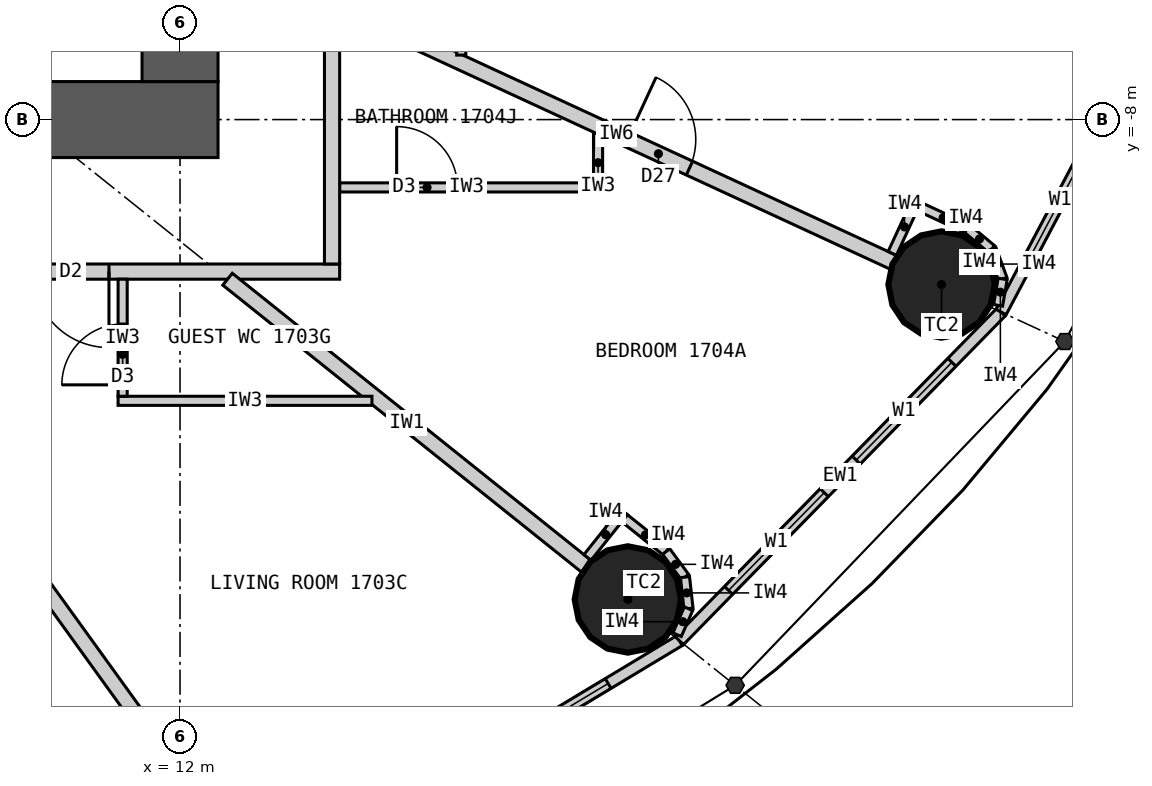
"""IFC4 building model, lengths in metres.
Left out: names, types, materials, properties, quantities, classifications, styles, units other than length and angle.
Written with IfcOpenShell. Run it as: python <this file> out.ifc"""

import sys

from ifc_helpers import new_model, si_unit, direction, frame, frame_2d, origin, origin_2d, place, context, subcontext, project, spatial, rectangle, circle, extrude, element, fill, save


model = new_model("IFC4")
c1 = context("Model", 3, precision=1e-05, world=origin(), true_north=direction((0.0, 1.0)))
c2 = subcontext(c1, "Body", "Model", "MODEL_VIEW")
j1 = project(units=[si_unit("LENGTHUNIT", "METRE"), si_unit("PLANEANGLEUNIT", "RADIAN")], contexts=[c1])
p1 = place(None, origin())
s1 = spatial("IfcSite", under=j1, at=p1, CompositionType="ELEMENT")
p2 = place(p1, origin())
s2 = spatial("IfcBuilding", under=s1, at=p2, CompositionType="ELEMENT")
p3 = place(p2, frame((0.0, 0.0, 70.5)))
s3 = spatial("IfcBuildingStorey", under=s2, at=p3, CompositionType="ELEMENT", Elevation=70.5)
for number, where, z_axis, x_axis in (
    (1, (17.892, -14.313, 0.0), (0.0, 0.0, 1.0), (1.0, 0.0, 0.0)),
    (2, (22.019, -10.17, 0.0), (0.0, 0.0, 1.0), (1.0, 0.0, 0.0)),
):
    element("IfcColumn", number, at=place(p3, frame(where, z_axis=z_axis, x_axis=x_axis)), inside=s3, PredefinedType="COLUMN", context=c2, shape_type="SweptSolid", body=[
        extrude(circle(Radius=0.7, at=origin_2d()), origin(), (0.0, 0.0, 1.0), 3.3),
    ])
p4 = place(p3, frame((12.5, -8.0, 0.0), z_axis=(0.0, 0.0, 1.0), x_axis=(-1.0, 0.0, 0.0)))
e3 = element("IfcWall", 3, at=p4, inside=s3, PredefinedType="SHEAR", context=c2, shape_type="SweptSolid", body=[
    extrude(rectangle(XDim=25.0, YDim=1.0, at=frame_2d((12.5, 0.0))), origin(), (0.0, 0.0, 1.0), 3.3),
])
p5 = place(p4, frame((11.2, 0.0, 0.0)))
e4 = element("IfcOpeningElement", 4, at=p5, cuts=e3, PredefinedType="OPENING", context=c2, shape_type="SweptSolid", body=[
    extrude(rectangle(XDim=1.2, YDim=2.2, at=frame_2d((0.6, 1.1))), frame((0.0, 0.51, 0.0), z_axis=(0.0, -1.0, 0.0), x_axis=(1.0, 0.0, 0.0)), (0.0, 0.0, 1.0), 1.02),
])
p6 = place(p4, frame((18.8, 0.0, 0.0)))
e5 = element("IfcOpeningElement", 5, at=p6, cuts=e3, PredefinedType="OPENING", context=c2, shape_type="SweptSolid", body=[
    extrude(rectangle(XDim=0.9, YDim=2.2, at=frame_2d((0.45, 1.1))), frame((0.0, 0.51, 0.0), z_axis=(0.0, -1.0, 0.0), x_axis=(1.0, 0.0, 0.0)), (0.0, 0.0, 1.0), 1.02),
])
p7 = place(p3, frame((12.0, -7.5, 0.0), z_axis=(0.0, 0.0, 1.0), x_axis=(0.0, 1.0, 0.0)))
e6 = element("IfcWall", 6, at=p7, inside=s3, PredefinedType="SHEAR", context=c2, shape_type="SweptSolid", body=[
    extrude(rectangle(XDim=15.0, YDim=1.0, at=frame_2d((7.5, 0.0))), origin(), (0.0, 0.0, 1.0), 3.3),
])
p8 = place(p7, frame((6.6, 0.0, 0.0)))
e7 = element("IfcOpeningElement", 7, at=p8, cuts=e6, PredefinedType="OPENING", context=c2, shape_type="SweptSolid", body=[
    extrude(rectangle(XDim=1.8, YDim=2.2, at=frame_2d((0.9, 1.1))), frame((0.0, 0.51, 0.0), z_axis=(0.0, -1.0, 0.0), x_axis=(1.0, 0.0, 0.0)), (0.0, 0.0, 1.0), 1.02),
])
p9 = place(p3, frame((13.096, -18.147, 0.0), z_axis=(0.0, 0.0, 1.0), x_axis=(0.856983180864, 0.515344377787, 0.0)))
e8 = element("IfcWall", 8, at=p9, inside=s3, PredefinedType="ELEMENTEDWALL", context=c2, shape_type="SweptSolid", body=[
    extrude(rectangle(XDim=6.386, YDim=0.15, at=frame_2d((3.193, 0.0))), origin(), (0.0, 0.0, 1.0), 3.12),
])
p10 = place(p9, frame((1.093, 0.0, 0.9)))
e9 = element("IfcOpeningElement", 9, at=p10, cuts=e8, PredefinedType="OPENING", context=c2, shape_type="SweptSolid", body=[
    extrude(rectangle(XDim=1.8, YDim=1.9, at=frame_2d((0.9, 0.95))), frame((0.0, 0.085, 0.0), z_axis=(0.0, -1.0, 0.0), x_axis=(1.0, 0.0, 0.0)), (0.0, 0.0, 1.0), 0.17),
])
p11 = place(p9, frame((3.493, 0.0, 0.9)))
e10 = element("IfcOpeningElement", 10, at=p11, cuts=e8, PredefinedType="OPENING", context=c2, shape_type="SweptSolid", body=[
    extrude(rectangle(XDim=1.8, YDim=1.9, at=frame_2d((0.9, 0.95))), frame((0.0, 0.085, 0.0), z_axis=(0.0, -1.0, 0.0), x_axis=(1.0, 0.0, 0.0)), (0.0, 0.0, 1.0), 0.17),
])
p12 = place(p3, frame((18.57, -14.856, 0.0), z_axis=(0.0, 0.0, 1.0), x_axis=(0.699602905915, 0.714531856557, 0.0)))
e11 = element("IfcWall", 11, at=p12, inside=s3, PredefinedType="ELEMENTEDWALL", context=c2, shape_type="SweptSolid", body=[
    extrude(rectangle(XDim=6.051, YDim=0.15, at=frame_2d((3.025, 0.0))), origin(), (0.0, 0.0, 1.0), 3.12),
])
p13 = place(p12, frame((0.926, 0.0, 0.9)))
e12 = element("IfcOpeningElement", 12, at=p13, cuts=e11, PredefinedType="OPENING", context=c2, shape_type="SweptSolid", body=[
    extrude(rectangle(XDim=1.8, YDim=1.9, at=frame_2d((0.9, 0.95))), frame((0.0, 0.085, 0.0), z_axis=(0.0, -1.0, 0.0), x_axis=(1.0, 0.0, 0.0)), (0.0, 0.0, 1.0), 0.17),
])
p14 = place(p12, frame((3.325, 0.0, 0.9)))
e13 = element("IfcOpeningElement", 13, at=p14, cuts=e11, PredefinedType="OPENING", context=c2, shape_type="SweptSolid", body=[
    extrude(rectangle(XDim=1.8, YDim=1.9, at=frame_2d((0.9, 0.95))), frame((0.0, 0.085, 0.0), z_axis=(0.0, -1.0, 0.0), x_axis=(1.0, 0.0, 0.0)), (0.0, 0.0, 1.0), 0.17),
])
p15 = place(p3, frame((22.803, -10.532, 0.0), z_axis=(0.0, 0.0, 1.0), x_axis=(0.467296867008, 0.884100468321, 0.0)))
e14 = element("IfcWall", 14, at=p15, inside=s3, PredefinedType="ELEMENTEDWALL", context=c2, shape_type="SweptSolid", body=[
    extrude(rectangle(XDim=5.734, YDim=0.15, at=frame_2d((2.867, 0.0))), origin(), (0.0, 0.0, 1.0), 3.12),
])
p16 = place(p15, frame((0.767, 0.0, 0.9)))
e15 = element("IfcOpeningElement", 15, at=p16, cuts=e14, PredefinedType="OPENING", context=c2, shape_type="SweptSolid", body=[
    extrude(rectangle(XDim=1.8, YDim=1.9, at=frame_2d((0.9, 0.95))), frame((0.0, 0.085, 0.0), z_axis=(0.0, -1.0, 0.0), x_axis=(1.0, 0.0, 0.0)), (0.0, 0.0, 1.0), 0.17),
])
p17 = place(p15, frame((3.167, 0.0, 0.9)))
e16 = element("IfcOpeningElement", 16, at=p17, cuts=e14, PredefinedType="OPENING", context=c2, shape_type="SweptSolid", body=[
    extrude(rectangle(XDim=1.8, YDim=1.9, at=frame_2d((0.9, 0.95))), frame((0.0, 0.085, 0.0), z_axis=(0.0, -1.0, 0.0), x_axis=(1.0, 0.0, 0.0)), (0.0, 0.0, 1.0), 0.17),
])
p18 = place(p3, frame((14.1, -10.0, 0.0), z_axis=(0.0, 0.0, 1.0), x_axis=(-1.0, 0.0, 0.0)))
e17 = element("IfcWall", 17, at=p18, inside=s3, PredefinedType="PARTITIONING", context=c2, shape_type="SweptSolid", body=[
    extrude(rectangle(XDim=28.2, YDim=0.2, at=frame_2d((14.1, 0.0))), origin(), (0.0, 0.0, 1.0), 3.12),
])
p19 = place(p18, frame((24.165, 0.0, 0.0)))
e18 = element("IfcOpeningElement", 18, at=p19, cuts=e17, PredefinedType="OPENING", context=c2, shape_type="SweptSolid", body=[
    extrude(rectangle(XDim=1.0, YDim=2.2, at=frame_2d((0.5, 1.1))), frame((0.0, 0.11, 0.0), z_axis=(0.0, -1.0, 0.0), x_axis=(1.0, 0.0, 0.0)), (0.0, 0.0, 1.0), 0.22),
])
p20 = place(p18, frame((14.923, 0.0, 0.0)))
e19 = element("IfcOpeningElement", 19, at=p20, cuts=e17, PredefinedType="OPENING", context=c2, shape_type="SweptSolid", body=[
    extrude(rectangle(XDim=1.0, YDim=2.2, at=frame_2d((0.5, 1.1))), frame((0.0, 0.11, 0.0), z_axis=(0.0, -1.0, 0.0), x_axis=(1.0, 0.0, 0.0)), (0.0, 0.0, 1.0), 0.22),
])
p21 = place(p18, frame((3.035, 0.0, 0.0)))
e20 = element("IfcOpeningElement", 20, at=p21, cuts=e17, PredefinedType="OPENING", context=c2, shape_type="SweptSolid", body=[
    extrude(rectangle(XDim=1.0, YDim=2.2, at=frame_2d((0.5, 1.1))), frame((0.0, 0.11, 0.0), z_axis=(0.0, -1.0, 0.0), x_axis=(1.0, 0.0, 0.0)), (0.0, 0.0, 1.0), 0.22),
])
p22 = place(p3, frame((7.289, -10.1, 0.0), z_axis=(0.0, 0.0, 1.0), x_axis=(0.585198353053, -0.810890182197, 0.0)))
e21 = element("IfcWall", 21, at=p22, inside=s3, PredefinedType="PARTITIONING", context=c2, shape_type="SweptSolid", body=[
    extrude(rectangle(XDim=8.36, YDim=0.2, at=frame_2d((4.18, 0.0))), origin(), (0.0, 0.0, 1.0), 2.32),
])
p23 = place(p22, frame((0.72, 0.0, 0.0)))
e22 = element("IfcOpeningElement", 22, at=p23, cuts=e21, PredefinedType="OPENING", context=c2, shape_type="SweptSolid", body=[
    extrude(rectangle(XDim=0.9, YDim=2.1, at=frame_2d((0.45, 1.05))), frame((0.0, 0.11, 0.0), z_axis=(0.0, -1.0, 0.0), x_axis=(1.0, 0.0, 0.0)), (0.0, 0.0, 1.0), 0.22),
])
p24 = place(p3, frame((12.625, -10.1, 0.0), z_axis=(0.0, 0.0, 1.0), x_axis=(0.780892451574, -0.624665493744, 0.0)))
e23 = element("IfcWall", 23, at=p24, inside=s3, PredefinedType="PARTITIONING", context=c2, shape_type="SweptSolid", body=[
    extrude(rectangle(XDim=6.045, YDim=0.2, at=frame_2d((3.022, 0.0))), origin(), (0.0, 0.0, 1.0), 2.32),
])
p25 = place(p3, frame((14.1, -6.512, 0.0), z_axis=(0.0, 0.0, 1.0), x_axis=(0.907832871056, -0.419332181247, 0.0)))
e24 = element("IfcWall", 24, at=p25, inside=s3, PredefinedType="PARTITIONING", context=c2, shape_type="SweptSolid", body=[
    extrude(rectangle(XDim=8.023, YDim=0.2, at=frame_2d((4.011, 0.0))), origin(), (0.0, 0.0, 1.0), 2.32),
])
p26 = place(p25, frame((4.17, 0.0, 0.0)))
e25 = element("IfcOpeningElement", 25, at=p26, cuts=e24, PredefinedType="OPENING", context=c2, shape_type="SweptSolid", body=[
    extrude(rectangle(XDim=0.9, YDim=2.1, at=frame_2d((0.45, 1.05))), frame((0.0, 0.11, 0.0), z_axis=(0.0, -1.0, 0.0), x_axis=(1.0, 0.0, 0.0)), (0.0, 0.0, 1.0), 0.22),
])
p27 = place(p3, frame((14.525, -11.7, 0.0), z_axis=(0.0, 0.0, 1.0), x_axis=(-1.0, 0.0, 0.0)))
e26 = element("IfcWall", 26, at=p27, inside=s3, PredefinedType="PARTITIONING", context=c2, shape_type="SweptSolid", body=[
    extrude(rectangle(XDim=3.34, YDim=0.12, at=frame_2d((1.67, 0.0))), origin(), (0.0, 0.0, 1.0), 3.12),
])
p28 = place(p3, frame((11.245, -10.1, 0.0), z_axis=(0.0, 0.0, 1.0), x_axis=(0.0, -1.0, 0.0)))
e27 = element("IfcWall", 27, at=p28, inside=s3, PredefinedType="PARTITIONING", context=c2, shape_type="SweptSolid", body=[
    extrude(rectangle(XDim=1.54, YDim=0.12, at=frame_2d((0.77, 0.0))), origin(), (0.0, 0.0, 1.0), 3.12),
])
p29 = place(p28, frame((0.59, 0.0, 0.0)))
e28 = element("IfcOpeningElement", 28, at=p29, cuts=e27, PredefinedType="OPENING", context=c2, shape_type="SweptSolid", body=[
    extrude(rectangle(XDim=0.8, YDim=2.1, at=frame_2d((0.4, 1.05))), frame((0.0, 0.07, 0.0), z_axis=(0.0, -1.0, 0.0), x_axis=(1.0, 0.0, 0.0)), (0.0, 0.0, 1.0), 0.14),
])
p30 = place(p3, frame((17.5, -8.183, 0.0), z_axis=(0.0, 0.0, 1.0), x_axis=(0.0, -1.0, 0.0)))
e29 = element("IfcWall", 29, at=p30, inside=s3, PredefinedType="PARTITIONING", context=c2, shape_type="SweptSolid", body=[
    extrude(rectangle(XDim=0.77, YDim=0.12, at=frame_2d((0.385, 0.0))), origin(), (0.0, 0.0, 1.0), 3.12),
])
p31 = place(p3, frame((14.1, -8.893, 0.0), z_axis=(0.0, 0.0, 1.0), x_axis=(1.0, 0.0, 0.0)))
e30 = element("IfcWall", 30, at=p31, inside=s3, PredefinedType="PARTITIONING", context=c2, shape_type="SweptSolid", body=[
    extrude(rectangle(XDim=3.34, YDim=0.12, at=frame_2d((1.67, 0.0))), origin(), (0.0, 0.0, 1.0), 3.12),
])
p32 = place(p31, frame((0.75, 0.0, 0.0)))
e31 = element("IfcOpeningElement", 31, at=p32, cuts=e30, PredefinedType="OPENING", context=c2, shape_type="SweptSolid", body=[
    extrude(rectangle(XDim=0.8, YDim=2.1, at=frame_2d((0.4, 1.05))), frame((0.0, 0.07, 0.0), z_axis=(0.0, -1.0, 0.0), x_axis=(1.0, 0.0, 0.0)), (0.0, 0.0, 1.0), 0.14),
])
p33 = place(p3, frame((15.7, -7.152, 0.0), z_axis=(0.0, 0.0, 1.0), x_axis=(0.0, 1.0, 0.0)))
e32 = element("IfcWall", 32, at=p33, inside=s3, PredefinedType="PARTITIONING", context=c2, shape_type="SweptSolid", body=[
    extrude(rectangle(XDim=2.079, YDim=0.12, at=frame_2d((1.04, 0.0))), origin(), (0.0, 0.0, 1.0), 3.12),
])
p34 = place(p3, frame((14.0, -9.9, 0.0), z_axis=(0.0, 0.0, 1.0), x_axis=(0.0, 1.0, 0.0)))
e33 = element("IfcWall", 33, at=p34, inside=s3, PredefinedType="PARTITIONING", context=c2, shape_type="SweptSolid", body=[
    extrude(rectangle(XDim=13.232, YDim=0.2, at=frame_2d((6.616, 0.0))), origin(), (0.0, 0.0, 1.0), 3.12),
])
p35 = place(p34, frame((4.948, 0.0, 0.0)))
e34 = element("IfcOpeningElement", 34, at=p35, cuts=e33, PredefinedType="OPENING", context=c2, shape_type="SweptSolid", body=[
    extrude(rectangle(XDim=1.0, YDim=2.2, at=frame_2d((0.5, 1.1))), frame((0.0, 0.11, 0.0), z_axis=(0.0, -1.0, 0.0), x_axis=(1.0, 0.0, 0.0)), (0.0, 0.0, 1.0), 0.22),
])
p36 = place(p34, frame((8.718, 0.0, 0.0)))
e35 = element("IfcOpeningElement", 35, at=p36, cuts=e33, PredefinedType="OPENING", context=c2, shape_type="SweptSolid", body=[
    extrude(rectangle(XDim=1.0, YDim=2.2, at=frame_2d((0.5, 1.1))), frame((0.0, 0.11, 0.0), z_axis=(0.0, -1.0, 0.0), x_axis=(1.0, 0.0, 0.0)), (0.0, 0.0, 1.0), 0.22),
])
p37 = place(p34, frame((11.74, 0.0, 0.0)))
e36 = element("IfcOpeningElement", 36, at=p37, cuts=e33, PredefinedType="OPENING", context=c2, shape_type="SweptSolid", body=[
    extrude(rectangle(XDim=1.0, YDim=2.2, at=frame_2d((0.5, 1.1))), frame((0.0, 0.11, 0.0), z_axis=(0.0, -1.0, 0.0), x_axis=(1.0, 0.0, 0.0)), (0.0, 0.0, 1.0), 0.22),
])
p38 = place(p3, frame((17.361, -13.76, 0.0), z_axis=(0.0, 0.0, 1.0), x_axis=(0.624501042889, 0.781023973659, 0.0)))
e37 = element("IfcWall", 37, at=p38, inside=s3, PredefinedType="PARTITIONING", context=c2, shape_type="SweptSolid", body=[
    extrude(rectangle(XDim=0.767, YDim=0.12, at=frame_2d((0.384, 0.0))), origin(), (0.0, 0.0, 1.0), 3.12),
])
p39 = place(p3, frame((17.85, -13.246, 0.0), z_axis=(0.0, 0.0, 1.0), x_axis=(0.780902834923, -0.62465251333, 0.0)))
e38 = element("IfcWall", 38, at=p39, inside=s3, PredefinedType="PARTITIONING", context=c2, shape_type="SweptSolid", body=[
    extrude(rectangle(XDim=0.7, YDim=0.12, at=frame_2d((0.35, 0.0))), origin(), (0.0, 0.0, 1.0), 3.12),
])
for number, where, z_axis, x_axis in (
    (39, (18.396, -13.683, 0.0), (0.0, 0.0, 1.0), (0.592, -0.806, 0.0)),
    (40, (18.644, -14.02, 0.0), (0.0, 0.0, 1.0), (0.11, -0.994, 0.0)),
):
    element("IfcWall", number, at=place(p3, frame(where, z_axis=z_axis, x_axis=x_axis)), inside=s3, PredefinedType="PARTITIONING", context=c2, shape_type="SweptSolid", body=[
        extrude(rectangle(XDim=0.418, YDim=0.12, at=frame_2d((0.209, 0.0))), origin(), (0.0, 0.0, 1.0), 3.12),
    ])
p40 = place(p3, frame((18.69, -14.435, 0.0), z_axis=(0.0, 0.0, 1.0), x_axis=(-0.401093412634, -0.91603715773, 0.0)))
e41 = element("IfcWall", 41, at=p40, inside=s3, PredefinedType="PARTITIONING", context=c2, shape_type="SweptSolid", body=[
    extrude(rectangle(XDim=0.373, YDim=0.12, at=frame_2d((0.187, 0.0))), origin(), (0.0, 0.0, 1.0), 3.12),
])
p41 = place(p3, frame((21.371, -9.761, 0.0), z_axis=(0.0, 0.0, 1.0), x_axis=(0.419259891039, 0.907866258744, 0.0)))
e42 = element("IfcWall", 42, at=p41, inside=s3, PredefinedType="PARTITIONING", context=c2, shape_type="SweptSolid", body=[
    extrude(rectangle(XDim=0.768, YDim=0.12, at=frame_2d((0.384, 0.0))), origin(), (0.0, 0.0, 1.0), 3.12),
])
p42 = place(p3, frame((21.722, -9.144, 0.0), z_axis=(0.0, 0.0, 1.0), x_axis=(0.907877701396, -0.419235112208, 0.0)))
e43 = element("IfcWall", 43, at=p42, inside=s3, PredefinedType="PARTITIONING", context=c2, shape_type="SweptSolid", body=[
    extrude(rectangle(XDim=0.7, YDim=0.12, at=frame_2d((0.35, 0.0))), origin(), (0.0, 0.0, 1.0), 3.12),
])
p43 = place(p3, frame((22.358, -9.437, 0.0), z_axis=(0.0, 0.0, 1.0), x_axis=(0.768412687942, -0.639954639806, 0.0)))
e44 = element("IfcWall", 44, at=p43, inside=s3, PredefinedType="PARTITIONING", context=c2, shape_type="SweptSolid", body=[
    extrude(rectangle(XDim=0.418, YDim=0.12, at=frame_2d((0.209, 0.0))), origin(), (0.0, 0.0, 1.0), 3.12),
])
p44 = place(p3, frame((22.679, -9.705, 0.0), z_axis=(0.0, 0.0, 1.0), x_axis=(0.345164001646, -0.938542386879, 0.0)))
e45 = element("IfcWall", 45, at=p44, inside=s3, PredefinedType="PARTITIONING", context=c2, shape_type="SweptSolid", body=[
    extrude(rectangle(XDim=0.418, YDim=0.12, at=frame_2d((0.209, 0.0))), origin(), (0.0, 0.0, 1.0), 3.12),
])
p45 = place(p3, frame((22.823, -10.097, 0.0), z_axis=(0.0, 0.0, 1.0), x_axis=(-0.169674995186, -0.985500074079, 0.0)))
e46 = element("IfcWall", 46, at=p45, inside=s3, PredefinedType="PARTITIONING", context=c2, shape_type="SweptSolid", body=[
    extrude(rectangle(XDim=0.353, YDim=0.12, at=frame_2d((0.176, 0.0))), origin(), (0.0, 0.0, 1.0), 3.12),
])
p46 = place(p11, origin())
e47 = element("IfcWindow", 47, at=p46, inside=s3, PartitioningType="SINGLE_PANEL", PredefinedType="WINDOW", context=c2, shape_type="SweptSolid", body=[
    extrude(rectangle(XDim=1.8, YDim=1.9, at=frame_2d((0.9, 0.95))), frame((0.0, 0.03, 0.0), z_axis=(0.0, -1.0, 0.0), x_axis=(1.0, 0.0, 0.0)), (0.0, 0.0, 1.0), 0.06),
])
fill(e10, e47)
p47 = place(p13, origin())
e48 = element("IfcWindow", 48, at=p47, inside=s3, PartitioningType="SINGLE_PANEL", PredefinedType="WINDOW", context=c2, shape_type="SweptSolid", body=[
    extrude(rectangle(XDim=1.8, YDim=1.9, at=frame_2d((0.9, 0.95))), frame((0.0, 0.03, 0.0), z_axis=(0.0, -1.0, 0.0), x_axis=(1.0, 0.0, 0.0)), (0.0, 0.0, 1.0), 0.06),
])
fill(e12, e48)
p48 = place(p14, origin())
e49 = element("IfcWindow", 49, at=p48, inside=s3, PartitioningType="SINGLE_PANEL", PredefinedType="WINDOW", context=c2, shape_type="SweptSolid", body=[
    extrude(rectangle(XDim=1.8, YDim=1.9, at=frame_2d((0.9, 0.95))), frame((0.0, 0.03, 0.0), z_axis=(0.0, -1.0, 0.0), x_axis=(1.0, 0.0, 0.0)), (0.0, 0.0, 1.0), 0.06),
])
fill(e13, e49)
p49 = place(p16, origin())
e50 = element("IfcWindow", 50, at=p49, inside=s3, PartitioningType="SINGLE_PANEL", PredefinedType="WINDOW", context=c2, shape_type="SweptSolid", body=[
    extrude(rectangle(XDim=1.8, YDim=1.9, at=frame_2d((0.9, 0.95))), frame((0.0, 0.03, 0.0), z_axis=(0.0, -1.0, 0.0), x_axis=(1.0, 0.0, 0.0)), (0.0, 0.0, 1.0), 0.06),
])
fill(e15, e50)
p50 = place(p29, origin())
e51 = element("IfcDoor", 51, at=p50, inside=s3, OperationType="SINGLE_SWING_RIGHT", PredefinedType="DOOR", context=c2, shape_type="SweptSolid", body=[
    extrude(rectangle(XDim=0.8, YDim=2.1, at=frame_2d((0.4, 1.05))), frame((0.0, 0.025, 0.0), z_axis=(0.0, -1.0, 0.0), x_axis=(1.0, 0.0, 0.0)), (0.0, 0.0, 1.0), 0.05),
])
fill(e28, e51)
p51 = place(p21, origin())
e52 = element("IfcDoor", 52, at=p51, inside=s3, OperationType="SINGLE_SWING_LEFT", PredefinedType="DOOR", context=c2, shape_type="SweptSolid", body=[
    extrude(rectangle(XDim=1.0, YDim=2.2, at=frame_2d((0.5, 1.1))), frame((0.0, 0.025, 0.0), z_axis=(0.0, -1.0, 0.0), x_axis=(1.0, 0.0, 0.0)), (0.0, 0.0, 1.0), 0.05),
])
fill(e20, e52)
p52 = place(p32, origin())
e53 = element("IfcDoor", 53, at=p52, inside=s3, OperationType="SINGLE_SWING_LEFT", PredefinedType="DOOR", context=c2, shape_type="SweptSolid", body=[
    extrude(rectangle(XDim=0.8, YDim=2.1, at=frame_2d((0.4, 1.05))), frame((0.0, 0.025, 0.0), z_axis=(0.0, -1.0, 0.0), x_axis=(1.0, 0.0, 0.0)), (0.0, 0.0, 1.0), 0.05),
])
fill(e31, e53)
p53 = place(p26, origin())
e54 = element("IfcDoor", 54, at=p53, inside=s3, OperationType="SINGLE_SWING_LEFT", PredefinedType="DOOR", context=c2, shape_type="SweptSolid", body=[
    extrude(rectangle(XDim=0.9, YDim=2.1, at=frame_2d((0.45, 1.05))), frame((0.0, 0.025, 0.0), z_axis=(0.0, -1.0, 0.0), x_axis=(1.0, 0.0, 0.0)), (0.0, 0.0, 1.0), 0.05),
])
fill(e25, e54)
save(model, sys.argv[1])
